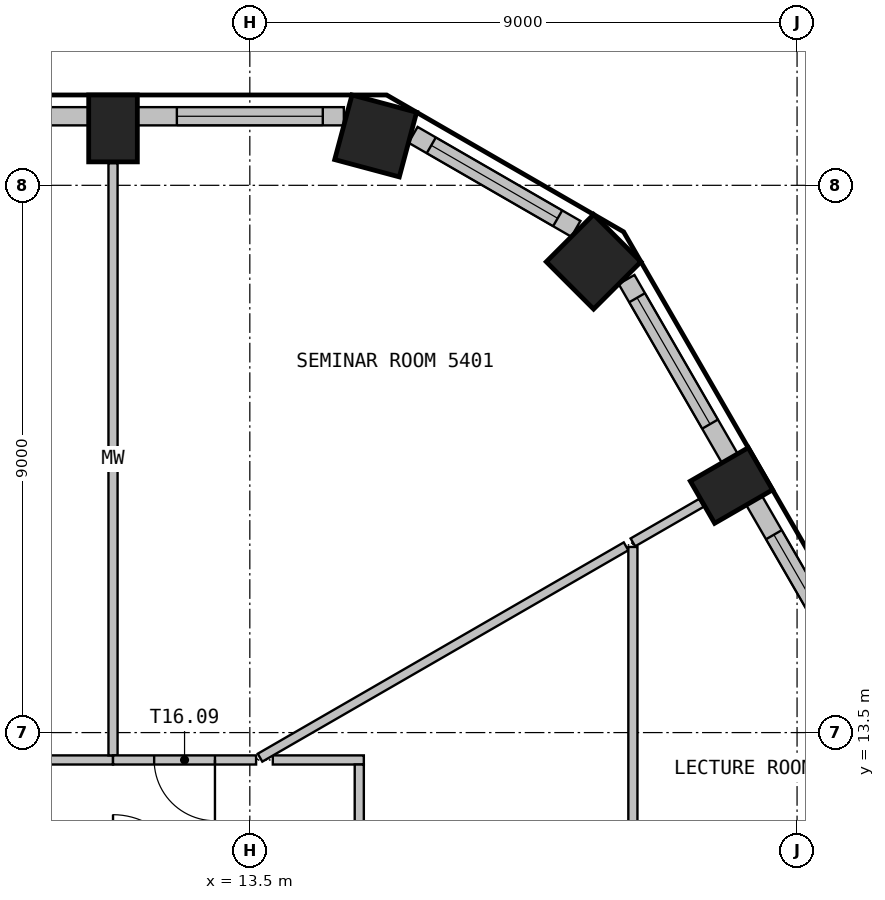
"""IFC4 building model, lengths in metres.
Left out: names, types, materials, properties, quantities, classifications, styles, units other than length and angle.
Written with IfcOpenShell. Run it as: python <this file> out.ifc"""

import sys

from ifc_helpers import new_model, si_unit, direction, frame, frame_2d, origin, origin_2d, place, context, subcontext, project, spatial, rectangle, extrude, element, fill, save


model = new_model("IFC4")
c1 = context("Model", 3, precision=1e-05, world=origin(), true_north=direction((0.0, 1.0)))
c2 = subcontext(c1, "Body", "Model", "MODEL_VIEW")
j1 = project(units=[si_unit("LENGTHUNIT", "METRE"), si_unit("PLANEANGLEUNIT", "RADIAN")], contexts=[c1])
p1 = place(None, origin())
s1 = spatial("IfcSite", under=j1, at=p1, CompositionType="ELEMENT")
p2 = place(p1, origin())
s2 = spatial("IfcBuilding", under=s1, at=p2, CompositionType="ELEMENT")
p3 = place(p2, frame((0.0, 0.0, 219.0)))
s3 = spatial("IfcBuildingStorey", under=s2, at=p3, CompositionType="ELEMENT", Elevation=219.0)
p4 = place(p3, frame((21.421, 17.563, 0.0), z_axis=(0.0, 0.0, 1.0), x_axis=(-0.5, 0.866025403784, 0.0)))
e1 = element("IfcColumn", 1, at=p4, inside=s3, PredefinedType="COLUMN", context=c2, shape_type="SweptSolid", body=[
    extrude(rectangle(XDim=0.8, YDim=1.1, at=origin_2d()), origin(), (0.0, 0.0, 1.0), 3.55),
])
for number, where, z_axis, x_axis in (
    (2, (19.154, 21.242, 0.0), (0.0, 0.0, 1.0), (-0.707, 0.707, 0.0)),
    (3, (15.57, 23.312, 0.0), (0.0, 0.0, 1.0), (-0.966, 0.259, 0.0)),
):
    element("IfcColumn", number, at=place(p3, frame(where, z_axis=z_axis, x_axis=x_axis)), inside=s3, PredefinedType="COLUMN", context=c2, shape_type="SweptSolid", body=[
        extrude(rectangle(XDim=1.1, YDim=1.1, at=origin_2d()), origin(), (0.0, 0.0, 1.0), 3.55),
    ])
p5 = place(p3, frame((11.25, 23.436, 0.0), z_axis=(0.0, 0.0, 1.0), x_axis=(-1.0, 0.0, 0.0)))
e4 = element("IfcColumn", 4, at=p5, inside=s3, PredefinedType="COLUMN", context=c2, shape_type="SweptSolid", body=[
    extrude(rectangle(XDim=0.8, YDim=1.1, at=origin_2d()), origin(), (0.0, 0.0, 1.0), 3.55),
])
p6 = place(p3, frame((23.644, 14.113, 0.0), z_axis=(0.0, 0.0, 1.0), x_axis=(-0.500029062817, 0.866008623709, 0.0)))
e5 = element("IfcWall", 5, at=p6, inside=s3, PredefinedType="SOLIDWALL", context=c2, shape_type="SweptSolid", body=[
    extrude(rectangle(XDim=3.699, YDim=0.3, at=frame_2d((1.85, 0.0))), origin(), (0.0, 0.0, 1.0), 3.55),
])
p7 = place(p6, frame((0.649, 0.0, 0.9)))
e6 = element("IfcOpeningElement", 6, at=p7, cuts=e5, PredefinedType="OPENING", context=c2, shape_type="SweptSolid", body=[
    extrude(rectangle(XDim=2.4, YDim=2.1, at=frame_2d((1.2, 1.05))), frame((0.0, 0.16, 0.0), z_axis=(0.0, -1.0, 0.0), x_axis=(1.0, 0.0, 0.0)), (0.0, 0.0, 1.0), 0.32),
])
p8 = place(p3, frame((21.394, 18.01, 0.0), z_axis=(0.0, 0.0, 1.0), x_axis=(-0.500012868213, 0.866017974191, 0.0)))
e7 = element("IfcWall", 7, at=p8, inside=s3, PredefinedType="SOLIDWALL", context=c2, shape_type="SweptSolid", body=[
    extrude(rectangle(XDim=3.396, YDim=0.3, at=frame_2d((1.698, 0.0))), origin(), (0.0, 0.0, 1.0), 3.55),
])
p9 = place(p8, frame((0.649, 0.0, 0.9)))
e8 = element("IfcOpeningElement", 8, at=p9, cuts=e7, PredefinedType="OPENING", context=c2, shape_type="SweptSolid", body=[
    extrude(rectangle(XDim=2.4, YDim=2.1, at=frame_2d((1.2, 1.05))), frame((0.0, 0.16, 0.0), z_axis=(0.0, -1.0, 0.0), x_axis=(1.0, 0.0, 0.0)), (0.0, 0.0, 1.0), 0.32),
])
p10 = place(p3, frame((18.863, 21.784, 0.0), z_axis=(0.0, 0.0, 1.0), x_axis=(-0.865994975416, 0.500052699777, 0.0)))
e9 = element("IfcWall", 9, at=p10, inside=s3, PredefinedType="SOLIDWALL", context=c2, shape_type="SweptSolid", body=[
    extrude(rectangle(XDim=3.093, YDim=0.3, at=frame_2d((1.546, 0.0))), origin(), (0.0, 0.0, 1.0), 3.55),
])
p11 = place(p10, frame((0.346, 0.0, 0.9)))
e10 = element("IfcOpeningElement", 10, at=p11, cuts=e9, PredefinedType="OPENING", context=c2, shape_type="SweptSolid", body=[
    extrude(rectangle(XDim=2.4, YDim=2.1, at=frame_2d((1.2, 1.05))), frame((0.0, 0.16, 0.0), z_axis=(0.0, -1.0, 0.0), x_axis=(1.0, 0.0, 0.0)), (0.0, 0.0, 1.0), 0.32),
])
p12 = place(p3, frame((15.046, 23.635, 0.0), z_axis=(0.0, 0.0, 1.0), x_axis=(-1.0, 0.0, 0.0)))
e11 = element("IfcWall", 11, at=p12, inside=s3, PredefinedType="SOLIDWALL", context=c2, shape_type="SweptSolid", body=[
    extrude(rectangle(XDim=3.396, YDim=0.3, at=frame_2d((1.698, 0.0))), origin(), (0.0, 0.0, 1.0), 3.55),
])
p13 = place(p12, frame((0.346, 0.0, 0.9)))
e12 = element("IfcOpeningElement", 12, at=p13, cuts=e11, PredefinedType="OPENING", context=c2, shape_type="SweptSolid", body=[
    extrude(rectangle(XDim=2.4, YDim=2.1, at=frame_2d((1.2, 1.05))), frame((0.0, 0.16, 0.0), z_axis=(0.0, -1.0, 0.0), x_axis=(1.0, 0.0, 0.0)), (0.0, 0.0, 1.0), 0.32),
])
p14 = place(p3, frame((10.85, 23.635, 0.0), z_axis=(0.0, 0.0, 1.0), x_axis=(-1.0, 0.0, 0.0)))
e13 = element("IfcWall", 13, at=p14, inside=s3, PredefinedType="SOLIDWALL", context=c2, shape_type="SweptSolid", body=[
    extrude(rectangle(XDim=3.699, YDim=0.3, at=frame_2d((1.85, 0.0))), origin(), (0.0, 0.0, 1.0), 3.55),
])
p15 = place(p14, frame((0.649, 0.0, 0.9)))
e14 = element("IfcOpeningElement", 14, at=p15, cuts=e13, PredefinedType="OPENING", context=c2, shape_type="SweptSolid", body=[
    extrude(rectangle(XDim=2.4, YDim=2.1, at=frame_2d((1.2, 1.05))), frame((0.0, 0.16, 0.0), z_axis=(0.0, -1.0, 0.0), x_axis=(1.0, 0.0, 0.0)), (0.0, 0.0, 1.0), 0.32),
])
p16 = place(p3, frame((11.25, 13.05, 0.0), z_axis=(0.0, 0.0, 1.0), x_axis=(-1.0, 0.0, 0.0)))
e15 = element("IfcWall", 15, at=p16, inside=s3, PredefinedType="PARTITIONING", context=c2, shape_type="SweptSolid", body=[
    extrude(rectangle(XDim=9.0, YDim=0.15, at=frame_2d((4.5, 0.0))), origin(), (0.0, 0.0, 1.0), 3.55),
])
p17 = place(p16, frame((4.0, 0.0, 0.0)))
e16 = element("IfcOpeningElement", 16, at=p17, cuts=e15, PredefinedType="OPENING", context=c2, shape_type="SweptSolid", body=[
    extrude(rectangle(XDim=1.0, YDim=2.1, at=frame_2d((0.5, 1.05))), frame((0.0, 0.085, 0.0), z_axis=(0.0, -1.0, 0.0), x_axis=(1.0, 0.0, 0.0)), (0.0, 0.0, 1.0), 0.17),
])
p18 = place(p3, frame((11.25, 22.865, 0.0), z_axis=(0.0, 0.0, 1.0), x_axis=(0.0, -1.0, 0.0)))
e17 = element("IfcWall", 17, at=p18, inside=s3, PredefinedType="MOVABLE", context=c2, shape_type="SweptSolid", body=[
    extrude(rectangle(XDim=9.74, YDim=0.15, at=frame_2d((4.87, 0.0))), origin(), (0.0, 0.0, 1.0), 3.55),
])
p19 = place(p3, frame((13.603, 13.05, 0.0), z_axis=(0.0, 0.0, 1.0), x_axis=(-1.0, 0.0, 0.0)))
e18 = element("IfcWall", 18, at=p19, inside=s3, PredefinedType="PARTITIONING", context=c2, shape_type="SweptSolid", body=[
    extrude(rectangle(XDim=2.353, YDim=0.15, at=frame_2d((1.177, 0.0))), origin(), (0.0, 0.0, 1.0), 3.55),
])
p20 = place(p19, frame((0.677, 0.0, 0.0)))
e19 = element("IfcOpeningElement", 19, at=p20, cuts=e18, PredefinedType="OPENING", context=c2, shape_type="SweptSolid", body=[
    extrude(rectangle(XDim=1.0, YDim=2.1, at=frame_2d((0.5, 1.05))), frame((0.0, 0.085, 0.0), z_axis=(0.0, -1.0, 0.0), x_axis=(1.0, 0.0, 0.0)), (0.0, 0.0, 1.0), 0.17),
])
p21 = place(p3, frame((15.375, 13.05, 0.0), z_axis=(0.0, 0.0, 1.0), x_axis=(-1.0, 0.0, 0.0)))
e20 = element("IfcWall", 20, at=p21, inside=s3, PredefinedType="PARTITIONING", context=c2, shape_type="SweptSolid", body=[
    extrude(rectangle(XDim=1.497, YDim=0.15, at=frame_2d((0.749, 0.0))), origin(), (0.0, 0.0, 1.0), 3.55),
])
p22 = place(p3, frame((19.688, 16.563, 0.0), z_axis=(0.0, 0.0, 1.0), x_axis=(-0.866012448988, -0.500022437694, 0.0)))
e21 = element("IfcWall", 21, at=p22, inside=s3, PredefinedType="PARTITIONING", context=c2, shape_type="SweptSolid", body=[
    extrude(rectangle(XDim=6.951, YDim=0.15, at=frame_2d((3.476, 0.0))), origin(), (0.0, 0.0, 1.0), 3.55),
])
p23 = place(p3, frame((15.3, 2.175, 0.0), z_axis=(0.0, 0.0, 1.0), x_axis=(0.0, 1.0, 0.0)))
e22 = element("IfcWall", 22, at=p23, inside=s3, PredefinedType="PARTITIONING", context=c2, shape_type="SweptSolid", body=[
    extrude(rectangle(XDim=10.8, YDim=0.15, at=frame_2d((5.4, 0.0))), origin(), (0.0, 0.0, 1.0), 3.55),
])
p24 = place(p23, frame((4.9, 0.0, 0.0)))
e23 = element("IfcOpeningElement", 23, at=p24, cuts=e22, PredefinedType="OPENING", context=c2, shape_type="SweptSolid", body=[
    extrude(rectangle(XDim=1.0, YDim=2.1, at=frame_2d((0.5, 1.05))), frame((0.0, 0.085, 0.0), z_axis=(0.0, -1.0, 0.0), x_axis=(1.0, 0.0, 0.0)), (0.0, 0.0, 1.0), 0.17),
])
p25 = place(p3, frame((19.8, 16.553, 0.0), z_axis=(0.0, 0.0, 1.0), x_axis=(0.0, -1.0, 0.0)))
e24 = element("IfcWall", 24, at=p25, inside=s3, PredefinedType="PARTITIONING", context=c2, shape_type="SweptSolid", body=[
    extrude(rectangle(XDim=14.228, YDim=0.15, at=frame_2d((7.114, 0.0))), origin(), (0.0, 0.0, 1.0), 3.55),
])
p26 = place(p3, frame((20.927, 17.278, 0.0), z_axis=(0.0, 0.0, 1.0), x_axis=(-0.866157475642, -0.499771175029, 0.0)))
e25 = element("IfcWall", 25, at=p26, inside=s3, PredefinedType="MOVABLE", context=c2, shape_type="SweptSolid", body=[
    extrude(rectangle(XDim=1.301, YDim=0.15, at=frame_2d((0.651, 0.0))), origin(), (0.0, 0.0, 1.0), 3.55),
])
p27 = place(p7, origin())
e26 = element("IfcWindow", 26, at=p27, inside=s3, PartitioningType="SINGLE_PANEL", PredefinedType="WINDOW", context=c2, shape_type="SweptSolid", body=[
    extrude(rectangle(XDim=2.4, YDim=2.1, at=frame_2d((1.2, 1.05))), frame((0.0, 0.03, 0.0), z_axis=(0.0, -1.0, 0.0), x_axis=(1.0, 0.0, 0.0)), (0.0, 0.0, 1.0), 0.06),
])
fill(e6, e26)
p28 = place(p9, origin())
e27 = element("IfcWindow", 27, at=p28, inside=s3, PartitioningType="SINGLE_PANEL", PredefinedType="WINDOW", context=c2, shape_type="SweptSolid", body=[
    extrude(rectangle(XDim=2.4, YDim=2.1, at=frame_2d((1.2, 1.05))), frame((0.0, 0.03, 0.0), z_axis=(0.0, -1.0, 0.0), x_axis=(1.0, 0.0, 0.0)), (0.0, 0.0, 1.0), 0.06),
])
fill(e8, e27)
p29 = place(p11, origin())
e28 = element("IfcWindow", 28, at=p29, inside=s3, PartitioningType="SINGLE_PANEL", PredefinedType="WINDOW", context=c2, shape_type="SweptSolid", body=[
    extrude(rectangle(XDim=2.4, YDim=2.1, at=frame_2d((1.2, 1.05))), frame((0.0, 0.03, 0.0), z_axis=(0.0, -1.0, 0.0), x_axis=(1.0, 0.0, 0.0)), (0.0, 0.0, 1.0), 0.06),
])
fill(e10, e28)
p30 = place(p13, origin())
e29 = element("IfcWindow", 29, at=p30, inside=s3, PartitioningType="SINGLE_PANEL", PredefinedType="WINDOW", context=c2, shape_type="SweptSolid", body=[
    extrude(rectangle(XDim=2.4, YDim=2.1, at=frame_2d((1.2, 1.05))), frame((0.0, 0.03, 0.0), z_axis=(0.0, -1.0, 0.0), x_axis=(1.0, 0.0, 0.0)), (0.0, 0.0, 1.0), 0.06),
])
fill(e12, e29)
p31 = place(p20, origin())
e30 = element("IfcDoor", 30, at=p31, inside=s3, OperationType="SINGLE_SWING_LEFT", PredefinedType="DOOR", context=c2, shape_type="SweptSolid", body=[
    extrude(rectangle(XDim=1.0, YDim=2.1, at=frame_2d((0.5, 1.05))), frame((0.0, 0.025, 0.0), z_axis=(0.0, -1.0, 0.0), x_axis=(1.0, 0.0, 0.0)), (0.0, 0.0, 1.0), 0.05),
])
fill(e19, e30)
save(model, sys.argv[1])
